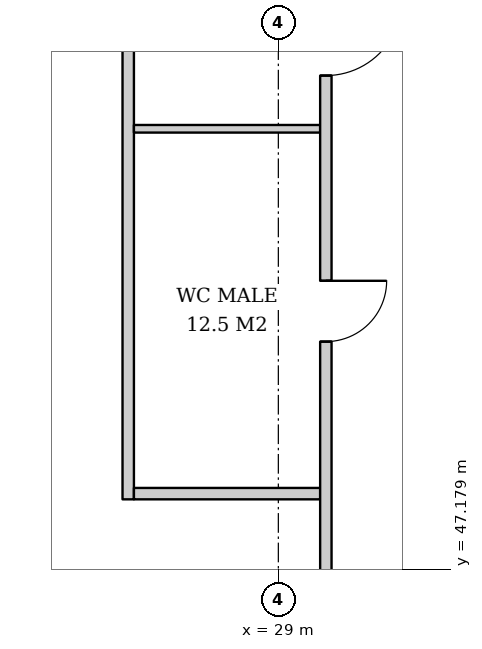
"""IFC4 building model, lengths in metres.
Left out: names, types, materials, properties, quantities, classifications, styles, units other than length and angle.
Written with IfcOpenShell. Run it as: python <this file> out.ifc"""

import sys

from ifc_helpers import new_model, si_unit, direction, frame, frame_2d, origin, place, context, subcontext, project, spatial, rectangle, extrude, element, fill, save


model = new_model("IFC4")
c1 = context("Model", 3, precision=1e-05, world=origin(), true_north=direction((0.0, 1.0)))
c2 = subcontext(c1, "Body", "Model", "MODEL_VIEW")
j1 = project(units=[si_unit("LENGTHUNIT", "METRE"), si_unit("PLANEANGLEUNIT", "RADIAN")], contexts=[c1])
p1 = place(None, origin())
s1 = spatial("IfcSite", under=j1, at=p1, CompositionType="ELEMENT")
p2 = place(p1, origin())
s2 = spatial("IfcBuilding", under=s1, at=p2, CompositionType="ELEMENT")
p3 = place(p2, frame((0.0, 0.0, 21.0)))
s3 = spatial("IfcBuildingStorey", under=s2, at=p3, CompositionType="ELEMENT", Elevation=21.0)
p4 = place(p3, frame((27.025, 60.25, 0.0), z_axis=(0.0, 0.0, 1.0), x_axis=(0.0, -1.0, 0.0)))
e1 = element("IfcWall", 1, at=p4, inside=s3, PredefinedType="PARTITIONING", context=c2, shape_type="SweptSolid", body=[
    extrude(rectangle(XDim=12.15, YDim=0.15, at=frame_2d((6.075, 0.0))), origin(), (0.0, 0.0, 1.0), 2.612),
])
p5 = place(p3, frame((29.55, 52.975, 0.0), z_axis=(0.0, 0.0, 1.0), x_axis=(-1.0, 0.0, 0.0)))
e2 = element("IfcWall", 2, at=p5, inside=s3, PredefinedType="SOLIDWALL", context=c2, shape_type="SweptSolid", body=[
    extrude(rectangle(XDim=2.45, YDim=0.1, at=frame_2d((1.225, 0.0))), origin(), (0.0, 0.0, 1.0), 3.62),
])
p6 = place(p3, frame((29.55, 48.175, 0.0), z_axis=(0.0, 0.0, 1.0), x_axis=(-1.0, 0.0, 0.0)))
e3 = element("IfcWall", 3, at=p6, inside=s3, PredefinedType="PARTITIONING", context=c2, shape_type="SweptSolid", body=[
    extrude(rectangle(XDim=2.45, YDim=0.15, at=frame_2d((1.225, 0.0))), origin(), (0.0, 0.0, 1.0), 3.62),
])
p7 = place(p3, frame((29.625, 61.45, 0.0), z_axis=(0.0, 0.0, 1.0), x_axis=(0.0, -1.0, 0.0)))
e4 = element("IfcWall", 4, at=p7, inside=s3, PredefinedType="PARTITIONING", context=c2, shape_type="SweptSolid", body=[
    extrude(rectangle(XDim=30.75, YDim=0.15, at=frame_2d((15.375, 0.0))), origin(), (0.0, 0.0, 1.0), 2.612),
])
p8 = place(p7, frame((3.275, 0.0, 0.0)))
e5 = element("IfcOpeningElement", 5, at=p8, cuts=e4, PredefinedType="OPENING", context=c2, shape_type="SweptSolid", body=[
    extrude(rectangle(XDim=0.8, YDim=2.1, at=frame_2d((0.4, 1.05))), frame((0.0, 0.085, 0.0), z_axis=(0.0, -1.0, 0.0), x_axis=(1.0, 0.0, 0.0)), (0.0, 0.0, 1.0), 0.17),
])
p9 = place(p7, frame((6.775, 0.0, 0.0)))
e6 = element("IfcOpeningElement", 6, at=p9, cuts=e4, PredefinedType="OPENING", context=c2, shape_type="SweptSolid", body=[
    extrude(rectangle(XDim=1.0, YDim=2.1, at=frame_2d((0.5, 1.05))), frame((0.0, 0.085, 0.0), z_axis=(0.0, -1.0, 0.0), x_axis=(1.0, 0.0, 0.0)), (0.0, 0.0, 1.0), 0.17),
])
p10 = place(p7, frame((10.475, 0.0, 0.0)))
e7 = element("IfcOpeningElement", 7, at=p10, cuts=e4, PredefinedType="OPENING", context=c2, shape_type="SweptSolid", body=[
    extrude(rectangle(XDim=0.8, YDim=2.1, at=frame_2d((0.4, 1.05))), frame((0.0, 0.085, 0.0), z_axis=(0.0, -1.0, 0.0), x_axis=(1.0, 0.0, 0.0)), (0.0, 0.0, 1.0), 0.17),
])
p11 = place(p9, origin())
e8 = element("IfcDoor", 8, at=p11, inside=s3, OperationType="SINGLE_SWING_LEFT", PredefinedType="DOOR", context=c2, shape_type="SweptSolid", body=[
    extrude(rectangle(XDim=1.0, YDim=2.1, at=frame_2d((0.5, 1.05))), frame((0.0, 0.025, 0.0), z_axis=(0.0, -1.0, 0.0), x_axis=(1.0, 0.0, 0.0)), (0.0, 0.0, 1.0), 0.05),
])
fill(e6, e8)
p12 = place(p10, origin())
e9 = element("IfcDoor", 9, at=p12, inside=s3, OperationType="SINGLE_SWING_LEFT", PredefinedType="DOOR", context=c2, shape_type="SweptSolid", body=[
    extrude(rectangle(XDim=0.8, YDim=2.1, at=frame_2d((0.4, 1.05))), frame((0.0, 0.025, 0.0), z_axis=(0.0, -1.0, 0.0), x_axis=(1.0, 0.0, 0.0)), (0.0, 0.0, 1.0), 0.05),
])
fill(e7, e9)
save(model, sys.argv[1])
